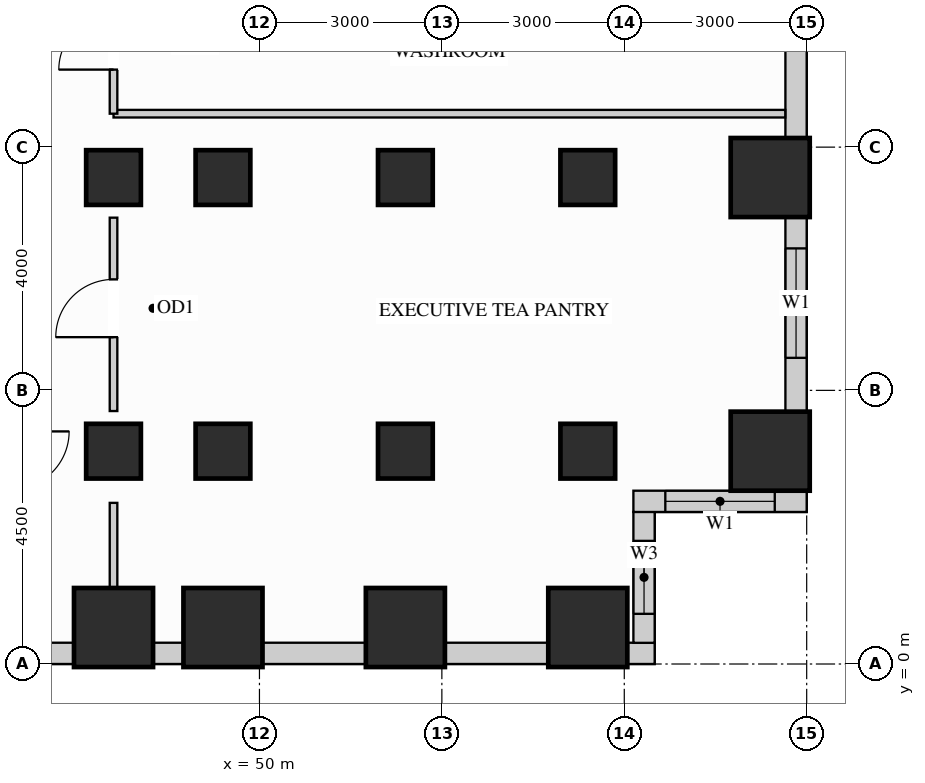
"""IFC4 building model, lengths in metres.
Left out: names, types, materials, properties, quantities, classifications, styles, units other than length and angle.
Written with IfcOpenShell. Run it as: python <this file> out.ifc"""

import sys

from ifc_helpers import new_model, si_unit, direction, frame, frame_2d, origin, origin_2d, place, context, subcontext, project, spatial, rectangle, extrude, source, transform, mapped, element, fill, save


model = new_model("IFC4")
c1 = context("Model", 3, precision=1e-05, world=origin(), true_north=direction((0.0, 1.0)))
c2 = subcontext(c1, "Body", "Model", "MODEL_VIEW")
j1 = project(units=[si_unit("LENGTHUNIT", "METRE"), si_unit("PLANEANGLEUNIT", "RADIAN")], contexts=[c1])
p1 = place(None, origin())
s1 = spatial("IfcSite", under=j1, at=p1, CompositionType="ELEMENT")
p2 = place(p1, origin())
s2 = spatial("IfcBuilding", under=s1, at=p2, CompositionType="ELEMENT")
p3 = place(p2, frame((0.0, 0.0, 29.7)))
s3 = spatial("IfcBuildingStorey", under=s2, at=p3, CompositionType="ELEMENT", Elevation=29.7)
m1 = source(origin(), c2, "Body", "SweptSolid", [
    extrude(rectangle(XDim=0.9, YDim=0.9, at=origin_2d()), origin(), (0.0, 0.0, 1.0), 3.38),
])
for number, where, z_axis, x_axis in (
    (1, (47.6, 3.5, 0.0), (0.0, 0.0, 1.0), (1.0, 0.0, 0.0)),
    (2, (47.6, 8.0, 0.0), (0.0, 0.0, 1.0), (1.0, 0.0, 0.0)),
    (3, (49.4, 3.5, 0.0), (0.0, 0.0, 1.0), (1.0, 0.0, 0.0)),
    (4, (49.4, 8.0, 0.0), (0.0, 0.0, 1.0), (1.0, 0.0, 0.0)),
    (5, (52.4, 3.5, 0.0), (0.0, 0.0, 1.0), (1.0, 0.0, 0.0)),
    (6, (52.4, 8.0, 0.0), (0.0, 0.0, 1.0), (1.0, 0.0, 0.0)),
    (7, (55.4, 3.5, 0.0), (0.0, 0.0, 1.0), (1.0, 0.0, 0.0)),
    (8, (55.4, 8.0, 0.0), (0.0, 0.0, 1.0), (1.0, 0.0, 0.0)),
):
    element("IfcColumn", number, at=place(p3, frame(where, z_axis=z_axis, x_axis=x_axis)), inside=s3, PredefinedType="COLUMN", context=c2, shape_type="MappedRepresentation", body=[
        mapped(m1, transform((0.0, 0.0, 0.0), x_axis=(1.0, 0.0, 0.0), y_axis=(0.0, 1.0, 0.0), z_axis=(0.0, 0.0, 1.0))),
    ])
m2 = source(origin(), c2, "Body", "SweptSolid", [
    extrude(rectangle(XDim=1.3, YDim=1.3, at=origin_2d()), origin(), (0.0, 0.0, 1.0), 3.38),
])
for number, where, z_axis, x_axis in (
    (9, (58.4, 3.5, 0.0), (0.0, 0.0, 1.0), (1.0, 0.0, 0.0)),
    (10, (58.4, 8.0, 0.0), (0.0, 0.0, 1.0), (1.0, 0.0, 0.0)),
    (11, (47.6, 0.6, 0.0), (0.0, 0.0, 1.0), (1.0, 0.0, 0.0)),
    (12, (49.4, 0.6, 0.0), (0.0, 0.0, 1.0), (1.0, 0.0, 0.0)),
    (13, (52.4, 0.6, 0.0), (0.0, 0.0, 1.0), (1.0, 0.0, 0.0)),
    (14, (55.4, 0.6, 0.0), (0.0, 0.0, 1.0), (1.0, 0.0, 0.0)),
):
    element("IfcColumn", number, at=place(p3, frame(where, z_axis=z_axis, x_axis=x_axis)), inside=s3, PredefinedType="COLUMN", context=c2, shape_type="MappedRepresentation", body=[
        mapped(m2, transform((0.0, 0.0, 0.0), x_axis=(1.0, 0.0, 0.0), y_axis=(0.0, 1.0, 0.0), z_axis=(0.0, 0.0, 1.0))),
    ])
p4 = place(p3, frame((40.648, 0.175, 0.0), z_axis=(0.0, 0.0, 1.0), x_axis=(1.0, 0.0, 0.0)))
e15 = element("IfcWall", 15, at=p4, inside=s3, PredefinedType="SOLIDWALL", context=c2, shape_type="SweptSolid", body=[
    extrude(rectangle(XDim=6.304, YDim=0.35, at=frame_2d((3.152, 0.0))), origin(), (0.0, 0.0, 1.0), 2.428),
])
p5 = place(p4, frame((0.687, 0.0, 0.78)))
e16 = element("IfcOpeningElement", 16, at=p5, cuts=e15, PredefinedType="OPENING", context=c2, shape_type="SweptSolid", body=[
    extrude(rectangle(XDim=1.8, YDim=1.468, at=frame_2d((0.9, 0.734))), frame((0.0, 0.185, 0.0), z_axis=(0.0, -1.0, 0.0), x_axis=(1.0, 0.0, 0.0)), (0.0, 0.0, 1.0), 0.37),
])
p6 = place(p4, frame((2.855, 0.0, 0.78)))
e17 = element("IfcOpeningElement", 17, at=p6, cuts=e15, PredefinedType="OPENING", context=c2, shape_type="SweptSolid", body=[
    extrude(rectangle(XDim=1.8, YDim=1.468, at=frame_2d((0.9, 0.734))), frame((0.0, 0.185, 0.0), z_axis=(0.0, -1.0, 0.0), x_axis=(1.0, 0.0, 0.0)), (0.0, 0.0, 1.0), 0.37),
])
m3 = source(origin(), c2, "Body", "SweptSolid", [
    extrude(rectangle(XDim=0.504, YDim=0.35, at=frame_2d((0.252, 0.0))), origin(), (0.0, 0.0, 1.0), 3.365),
])
p7 = place(p3, frame((48.248, 0.175, 0.0), z_axis=(0.0, 0.0, 1.0), x_axis=(1.0, 0.0, 0.0)))
e18 = element("IfcWall", 18, at=p7, inside=s3, PredefinedType="SOLIDWALL", context=c2, shape_type="MappedRepresentation", body=[
    mapped(m3, transform((0.0, 0.0, 0.0), x_axis=(1.0, 0.0, 0.0), y_axis=(0.0, 1.0, 0.0), z_axis=(0.0, 0.0, 1.0))),
])
m4 = source(origin(), c2, "Body", "SweptSolid", [
    extrude(rectangle(XDim=1.704, YDim=0.35, at=frame_2d((0.852, 0.0))), origin(), (0.0, 0.0, 1.0), 2.51),
])
for number, where, z_axis, x_axis in (
    (19, (50.048, 0.175, 0.0), (0.0, 0.0, 1.0), (1.0, 0.0, 0.0)),
    (20, (53.048, 0.175, 0.0), (0.0, 0.0, 1.0), (1.0, 0.0, 0.0)),
):
    element("IfcWall", number, at=place(p3, frame(where, z_axis=z_axis, x_axis=x_axis)), inside=s3, PredefinedType="SOLIDWALL", context=c2, shape_type="MappedRepresentation", body=[
        mapped(m4, transform((0.0, 0.0, 0.0), x_axis=(1.0, 0.0, 0.0), y_axis=(0.0, 1.0, 0.0), z_axis=(0.0, 0.0, 1.0))),
    ])
m5 = source(origin(), c2, "Body", "SweptSolid", [
    extrude(rectangle(XDim=0.452, YDim=0.35, at=frame_2d((0.226, 0.0))), origin(), (0.0, 0.0, 1.0), 3.365),
])
p8 = place(p3, frame((56.048, 0.175, 0.0), z_axis=(0.0, 0.0, 1.0), x_axis=(1.0, 0.0, 0.0)))
e21 = element("IfcWall", 21, at=p8, inside=s3, PredefinedType="SOLIDWALL", context=c2, shape_type="MappedRepresentation", body=[
    mapped(m5, transform((0.0, 0.0, 0.0), x_axis=(1.0, 0.0, 0.0), y_axis=(0.0, 1.0, 0.0), z_axis=(0.0, 0.0, 1.0))),
])
p9 = place(p3, frame((56.325, 0.348, 0.0), z_axis=(0.0, 0.0, 1.0), x_axis=(0.0, 1.0, 0.0)))
e22 = element("IfcWall", 22, at=p9, inside=s3, PredefinedType="SOLIDWALL", context=c2, shape_type="SweptSolid", body=[
    extrude(rectangle(XDim=2.154, YDim=0.35, at=frame_2d((1.077, 0.0))), origin(), (0.0, 0.0, 1.0), 3.365),
])
p10 = place(p9, frame((0.477, 0.0, 0.78)))
e23 = element("IfcOpeningElement", 23, at=p10, cuts=e22, PredefinedType="OPENING", context=c2, shape_type="SweptSolid", body=[
    extrude(rectangle(XDim=1.2, YDim=2.1, at=frame_2d((0.6, 1.05))), frame((0.0, 0.185, 0.0), z_axis=(0.0, -1.0, 0.0), x_axis=(1.0, 0.0, 0.0)), (0.0, 0.0, 1.0), 0.37),
])
p11 = place(p3, frame((56.15, 2.675, 0.0), z_axis=(0.0, 0.0, 1.0), x_axis=(1.0, 0.0, 0.0)))
e24 = element("IfcWall", 24, at=p11, inside=s3, PredefinedType="SOLIDWALL", context=c2, shape_type="SweptSolid", body=[
    extrude(rectangle(XDim=2.85, YDim=0.35, at=frame_2d((1.425, 0.0))), origin(), (0.0, 0.0, 1.0), 3.365),
])
p12 = place(p11, frame((0.525, 0.0, 0.78)))
e25 = element("IfcOpeningElement", 25, at=p12, cuts=e24, PredefinedType="OPENING", context=c2, shape_type="SweptSolid", body=[
    extrude(rectangle(XDim=1.8, YDim=2.1, at=frame_2d((0.9, 1.05))), frame((0.0, 0.185, 0.0), z_axis=(0.0, -1.0, 0.0), x_axis=(1.0, 0.0, 0.0)), (0.0, 0.0, 1.0), 0.37),
])
p13 = place(p3, frame((58.825, 4.148, 0.0), z_axis=(0.0, 0.0, 1.0), x_axis=(0.0, 1.0, 0.0)))
e26 = element("IfcWall", 26, at=p13, inside=s3, PredefinedType="SOLIDWALL", context=c2, shape_type="SweptSolid", body=[
    extrude(rectangle(XDim=3.204, YDim=0.35, at=frame_2d((1.602, 0.0))), origin(), (0.0, 0.0, 1.0), 2.51),
])
p14 = place(p13, frame((0.887, 0.0, 0.78)))
e27 = element("IfcOpeningElement", 27, at=p14, cuts=e26, PredefinedType="OPENING", context=c2, shape_type="SweptSolid", body=[
    extrude(rectangle(XDim=1.8, YDim=1.55, at=frame_2d((0.9, 0.775))), frame((0.0, 0.185, 0.0), z_axis=(0.0, -1.0, 0.0), x_axis=(1.0, 0.0, 0.0)), (0.0, 0.0, 1.0), 0.37),
])
m6 = source(origin(), c2, "Body", "SweptSolid", [
    extrude(rectangle(XDim=4.204, YDim=0.35, at=frame_2d((2.102, 0.0))), origin(), (0.0, 0.0, 1.0), 2.51),
])
p15 = place(p3, frame((58.825, 8.648, 0.0), z_axis=(0.0, 0.0, 1.0), x_axis=(0.0, 1.0, 0.0)))
e28 = element("IfcWall", 28, at=p15, inside=s3, PredefinedType="SOLIDWALL", context=c2, shape_type="MappedRepresentation", body=[
    mapped(m6, transform((0.0, 0.0, 0.0), x_axis=(1.0, 0.0, 0.0), y_axis=(0.0, 1.0, 0.0), z_axis=(0.0, 0.0, 1.0))),
])
m7 = source(origin(), c2, "Body", "SweptSolid", [
    extrude(rectangle(XDim=11.048, YDim=0.125, at=frame_2d((5.524, 0.0))), origin(), (0.0, 0.0, 1.0), 3.365),
])
p16 = place(p3, frame((47.6, 9.05, 0.0), z_axis=(0.0, 0.0, 1.0), x_axis=(1.0, 0.0, 0.0)))
e29 = element("IfcWall", 29, at=p16, inside=s3, PredefinedType="PARTITIONING", context=c2, shape_type="MappedRepresentation", body=[
    mapped(m7, transform((0.0, 0.0, 0.0), x_axis=(1.0, 0.0, 0.0), y_axis=(0.0, 1.0, 0.0), z_axis=(0.0, 0.0, 1.0))),
])
p17 = place(p3, frame((47.6, 4.16, 0.0), z_axis=(0.0, 0.0, 1.0), x_axis=(0.0, 1.0, 0.0)))
e30 = element("IfcWall", 30, at=p17, inside=s3, PredefinedType="PARTITIONING", context=c2, shape_type="SweptSolid", body=[
    extrude(rectangle(XDim=3.18, YDim=0.125, at=frame_2d((1.59, 0.0))), origin(), (0.0, 0.0, 1.0), 2.67),
])
p18 = place(p17, frame((1.215, 0.0, 0.0)))
e31 = element("IfcOpeningElement", 31, at=p18, cuts=e30, PredefinedType="OPENING", context=c2, shape_type="SweptSolid", body=[
    extrude(rectangle(XDim=0.95, YDim=2.15, at=frame_2d((0.475, 1.075))), frame((0.0, 0.073, 0.0), z_axis=(0.0, -1.0, 0.0), x_axis=(1.0, 0.0, 0.0)), (0.0, 0.0, 1.0), 0.145),
])
m8 = source(origin(), c2, "Body", "SweptSolid", [
    extrude(rectangle(XDim=1.39, YDim=0.125, at=frame_2d((0.695, 0.0))), origin(), (0.0, 0.0, 1.0), 2.67),
])
p19 = place(p3, frame((47.6, 1.26, 0.0), z_axis=(0.0, 0.0, 1.0), x_axis=(0.0, 1.0, 0.0)))
e32 = element("IfcWall", 32, at=p19, inside=s3, PredefinedType="PARTITIONING", context=c2, shape_type="MappedRepresentation", body=[
    mapped(m8, transform((0.0, 0.0, 0.0), x_axis=(1.0, 0.0, 0.0), y_axis=(0.0, 1.0, 0.0), z_axis=(0.0, 0.0, 1.0))),
])
p20 = place(p3, frame((47.6, 9.05, 0.0), z_axis=(0.0, 0.0, 1.0), x_axis=(0.0, 1.0, 0.0)))
e33 = element("IfcWall", 33, at=p20, inside=s3, PredefinedType="PARTITIONING", context=c2, shape_type="SweptSolid", body=[
    extrude(rectangle(XDim=2.4, YDim=0.125, at=frame_2d((1.2, 0.0))), origin(), (0.0, 0.0, 1.0), 2.67),
])
p21 = place(p20, frame((0.725, 0.0, 0.0)))
e34 = element("IfcOpeningElement", 34, at=p21, cuts=e33, PredefinedType="OPENING", context=c2, shape_type="SweptSolid", body=[
    extrude(rectangle(XDim=0.9, YDim=2.15, at=frame_2d((0.45, 1.075))), frame((0.0, 0.073, 0.0), z_axis=(0.0, -1.0, 0.0), x_axis=(1.0, 0.0, 0.0)), (0.0, 0.0, 1.0), 0.145),
])
m9 = source(origin(), c2, "Body", "SweptSolid", [
    extrude(rectangle(XDim=0.95, YDim=2.15, at=frame_2d((0.475, 1.075))), frame((0.0, 0.025, 0.0), z_axis=(0.0, -1.0, 0.0), x_axis=(1.0, 0.0, 0.0)), (0.0, 0.0, 1.0), 0.05),
])
p22 = place(p18, origin())
e35 = element("IfcDoor", 35, at=p22, inside=s3, OperationType="SINGLE_SWING_LEFT", PredefinedType="DOOR", context=c2, shape_type="MappedRepresentation", body=[
    mapped(m9, transform((0.0, 0.0, 0.0), x_axis=(1.0, 0.0, 0.0), y_axis=(0.0, 1.0, 0.0), z_axis=(0.0, 0.0, 1.0))),
])
fill(e31, e35)
m10 = source(origin(), c2, "Body", "SweptSolid", [
    extrude(rectangle(XDim=0.9, YDim=2.15, at=frame_2d((0.45, 1.075))), frame((0.0, 0.025, 0.0), z_axis=(0.0, -1.0, 0.0), x_axis=(1.0, 0.0, 0.0)), (0.0, 0.0, 1.0), 0.05),
])
p23 = place(p21, origin())
e36 = element("IfcDoor", 36, at=p23, inside=s3, OperationType="SINGLE_SWING_LEFT", PredefinedType="DOOR", context=c2, shape_type="MappedRepresentation", body=[
    mapped(m10, transform((0.0, 0.0, 0.0), x_axis=(1.0, 0.0, 0.0), y_axis=(0.0, 1.0, 0.0), z_axis=(0.0, 0.0, 1.0))),
])
fill(e34, e36)
m11 = source(origin(), c2, "Body", "SweptSolid", [
    extrude(rectangle(XDim=1.8, YDim=2.1, at=frame_2d((0.9, 1.05))), frame((0.0, 0.03, 0.0), z_axis=(0.0, -1.0, 0.0), x_axis=(1.0, 0.0, 0.0)), (0.0, 0.0, 1.0), 0.06),
])
p24 = place(p12, origin())
e37 = element("IfcWindow", 37, at=p24, inside=s3, PartitioningType="SINGLE_PANEL", PredefinedType="WINDOW", context=c2, shape_type="MappedRepresentation", body=[
    mapped(m11, transform((0.0, 0.0, 0.0), x_axis=(1.0, 0.0, 0.0), y_axis=(0.0, 1.0, 0.0), z_axis=(0.0, 0.0, 1.0))),
])
fill(e25, e37)
m12 = source(origin(), c2, "Body", "SweptSolid", [
    extrude(rectangle(XDim=1.8, YDim=1.55, at=frame_2d((0.9, 0.775))), frame((0.0, 0.03, 0.0), z_axis=(0.0, -1.0, 0.0), x_axis=(1.0, 0.0, 0.0)), (0.0, 0.0, 1.0), 0.06),
])
p25 = place(p14, origin())
e38 = element("IfcWindow", 38, at=p25, inside=s3, PartitioningType="SINGLE_PANEL", PredefinedType="WINDOW", context=c2, shape_type="MappedRepresentation", body=[
    mapped(m12, transform((0.0, 0.0, 0.0), x_axis=(1.0, 0.0, 0.0), y_axis=(0.0, 1.0, 0.0), z_axis=(0.0, 0.0, 1.0))),
])
fill(e27, e38)
m13 = source(origin(), c2, "Body", "SweptSolid", [
    extrude(rectangle(XDim=1.2, YDim=2.1, at=frame_2d((0.6, 1.05))), frame((0.0, 0.03, 0.0), z_axis=(0.0, -1.0, 0.0), x_axis=(1.0, 0.0, 0.0)), (0.0, 0.0, 1.0), 0.06),
])
p26 = place(p10, origin())
e39 = element("IfcWindow", 39, at=p26, inside=s3, PartitioningType="SINGLE_PANEL", PredefinedType="WINDOW", context=c2, shape_type="MappedRepresentation", body=[
    mapped(m13, transform((0.0, 0.0, 0.0), x_axis=(1.0, 0.0, 0.0), y_axis=(0.0, 1.0, 0.0), z_axis=(0.0, 0.0, 1.0))),
])
fill(e23, e39)
save(model, sys.argv[1])
